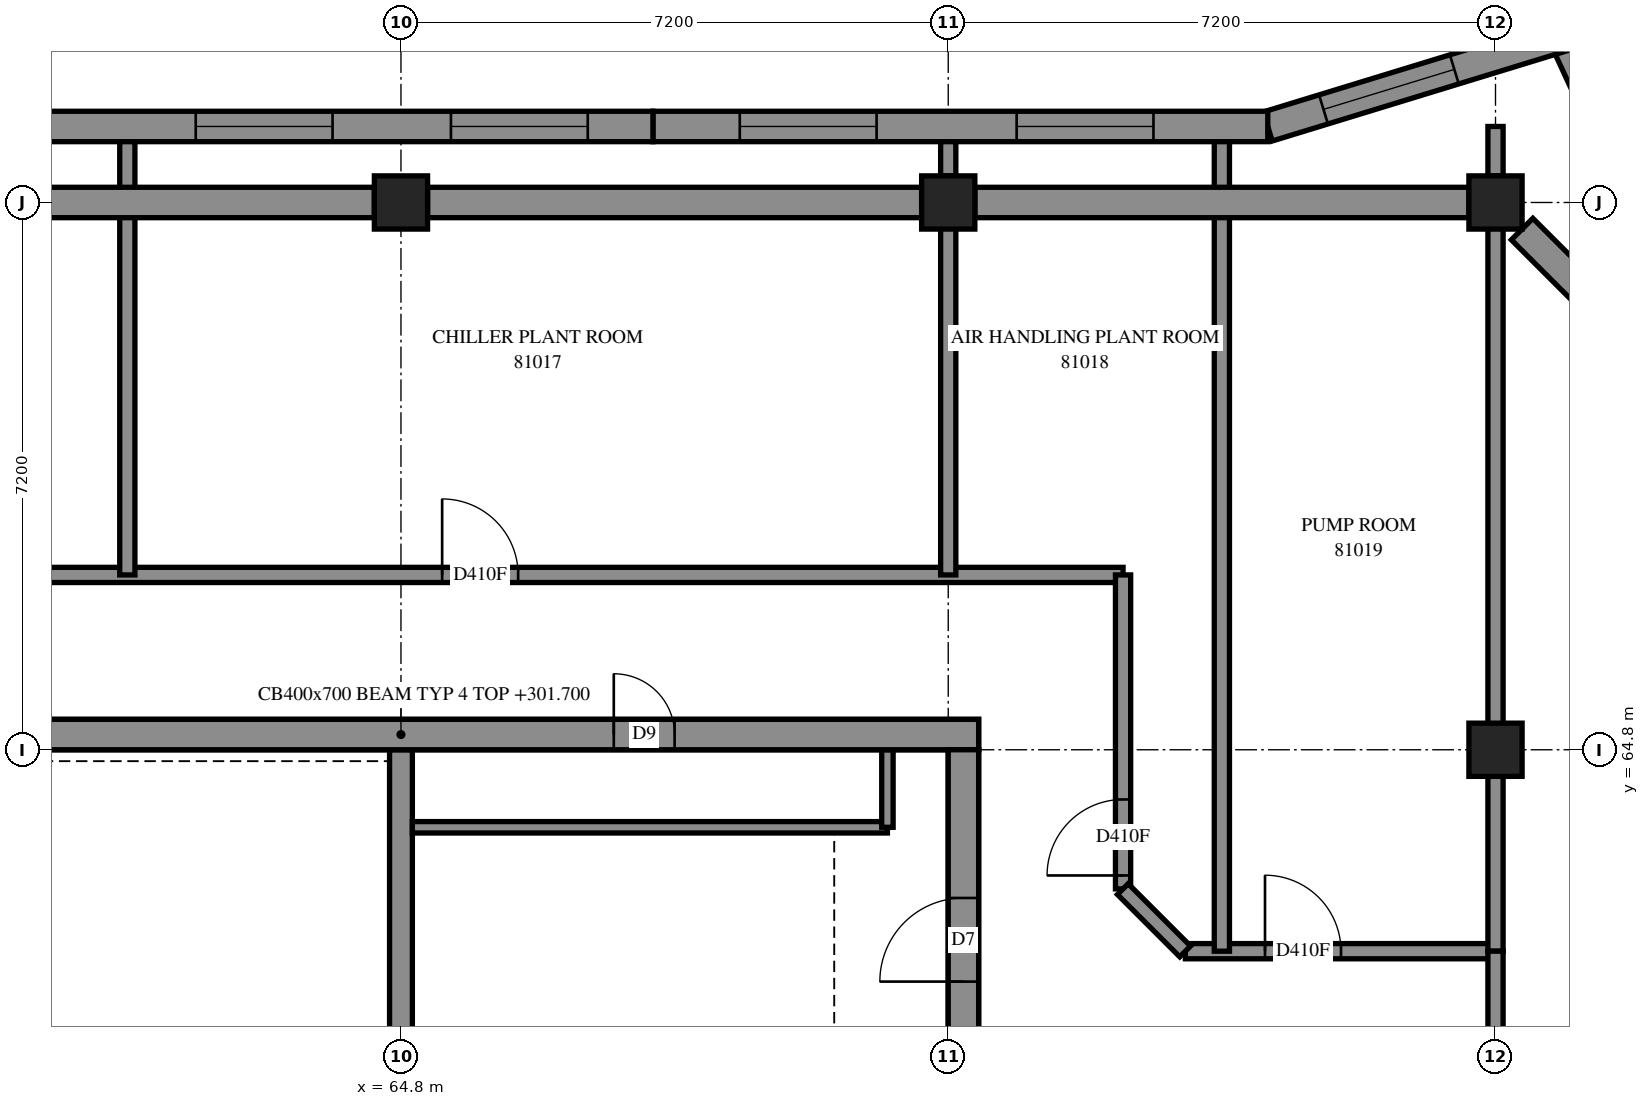
"""IFC4 building model, lengths in metres.
Left out: names, types, materials, properties, quantities, classifications, styles, units other than length and angle.
Written with IfcOpenShell. Run it as: python <this file> out.ifc"""

import sys

from ifc_helpers import new_model, si_unit, direction, frame, frame_2d, origin, origin_2d, place, context, subcontext, project, spatial, polyline, rectangle, outline, extrude, element, fill, save


model = new_model("IFC4")
c1 = context("Model", 3, precision=1e-05, world=origin(), true_north=direction((0.0, 1.0)))
c2 = subcontext(c1, "Body", "Model", "MODEL_VIEW")
j1 = project(units=[si_unit("LENGTHUNIT", "METRE"), si_unit("PLANEANGLEUNIT", "RADIAN")], contexts=[c1])
p1 = place(None, origin())
s1 = spatial("IfcSite", under=j1, at=p1, CompositionType="ELEMENT")
p2 = place(p1, origin())
s2 = spatial("IfcBuilding", under=s1, at=p2, CompositionType="ELEMENT")
p3 = place(p2, frame((0.0, 0.0, 298.2)))
s3 = spatial("IfcBuildingStorey", under=s2, at=p3, CompositionType="ELEMENT", Elevation=298.2)
for number, where, z_axis, x_axis in (
    (1, (64.8, 72.0, 0.0), (0.0, 0.0, 1.0), (1.0, 0.0, 0.0)),
    (2, (72.0, 72.0, 0.0), (0.0, 0.0, 1.0), (1.0, 0.0, 0.0)),
    (3, (79.2, 64.8, 0.0), (0.0, 0.0, 1.0), (1.0, 0.0, 0.0)),
    (4, (79.2, 72.0, 0.0), (0.0, 0.0, 1.0), (1.0, 0.0, 0.0)),
):
    element("IfcColumn", number, at=place(p3, frame(where, z_axis=z_axis, x_axis=x_axis)), inside=s3, PredefinedType="COLUMN", context=c2, shape_type="SweptSolid", body=[
        extrude(rectangle(XDim=0.7, YDim=0.7, at=origin_2d()), origin(), (0.0, 0.0, 1.0), 3.5),
    ])
p4 = place(p3, frame((57.2, 65.0, -0.3), z_axis=(0.0, 0.0, 1.0), x_axis=(1.0, 0.0, 0.0)))
e5 = element("IfcWall", 5, at=p4, inside=s3, PredefinedType="SHEAR", context=c2, shape_type="SweptSolid", body=[
    extrude(outline(polyline([(0.0, 0.0), (15.2, 0.0), (15.2, 3.1), (0.0, 3.1), (0.0, 0.0)])), frame((0.0, 0.2, 0.0), z_axis=(0.0, -1.0, 0.0), x_axis=(1.0, 0.0, 0.0)), (0.0, 0.0, 1.0), 0.4),
])
p5 = place(p4, frame((10.4, 0.0, 0.3)))
e6 = element("IfcOpeningElement", 6, at=p5, cuts=e5, PredefinedType="OPENING", context=c2, shape_type="SweptSolid", body=[
    extrude(rectangle(XDim=0.8, YDim=2.1, at=frame_2d((0.4, 1.05))), frame((0.0, 0.21, 0.0), z_axis=(0.0, -1.0, 0.0), x_axis=(1.0, 0.0, 0.0)), (0.0, 0.0, 1.0), 0.42),
])
p6 = place(p3, frame((72.2, 50.4, -0.3), z_axis=(0.0, 0.0, 1.0), x_axis=(0.0, 1.0, 0.0)))
e7 = element("IfcWall", 7, at=p6, inside=s3, PredefinedType="SHEAR", context=c2, shape_type="SweptSolid", body=[
    extrude(outline(polyline([(0.0, 0.0), (14.4, 0.0), (14.4, 3.1), (0.0, 3.1), (0.0, 0.0)])), frame((0.0, 0.2, 0.0), z_axis=(0.0, -1.0, 0.0), x_axis=(1.0, 0.0, 0.0)), (0.0, 0.0, 1.0), 0.4),
])
p7 = place(p6, frame((4.55, 0.0, 0.3)))
e8 = element("IfcOpeningElement", 8, at=p7, cuts=e7, PredefinedType="OPENING", context=c2, shape_type="SweptSolid", body=[
    extrude(rectangle(XDim=1.1, YDim=2.1, at=frame_2d((0.55, 1.05))), frame((0.0, 0.21, 0.0), z_axis=(0.0, -1.0, 0.0), x_axis=(1.0, 0.0, 0.0)), (0.0, 0.0, 1.0), 0.42),
])
p8 = place(p6, frame((11.35, 0.0, 0.3)))
e9 = element("IfcOpeningElement", 9, at=p8, cuts=e7, PredefinedType="OPENING", context=c2, shape_type="SweptSolid", body=[
    extrude(rectangle(XDim=1.1, YDim=2.1, at=frame_2d((0.55, 1.05))), frame((0.0, 0.21, 0.0), z_axis=(0.0, -1.0, 0.0), x_axis=(1.0, 0.0, 0.0)), (0.0, 0.0, 1.0), 0.42),
])
p9 = place(p3, frame((64.8, 60.6, 0.0), z_axis=(0.0, 0.0, 1.0), x_axis=(0.0, 1.0, 0.0)))
e10 = element("IfcWall", 10, at=p9, inside=s3, PredefinedType="SOLIDWALL", context=c2, shape_type="SweptSolid", body=[
    extrude(outline(polyline([(0.0, 0.0), (4.2, 0.0), (4.2, 3.5), (0.0, 3.5), (0.0, 0.0)])), frame((0.0, 0.15, 0.0), z_axis=(0.0, -1.0, 0.0), x_axis=(1.0, 0.0, 0.0)), (0.0, 0.0, 1.0), 0.3),
])
p10 = place(p3, frame((81.53, 71.085, 0.0), z_axis=(0.0, 0.0, 1.0), x_axis=(-0.4192676059, 0.9078626959, 0.0)))
e11 = element("IfcWall", 11, at=p10, inside=s3, PredefinedType="SOLIDWALL", context=c2, shape_type="SweptSolid", body=[
    extrude(outline(polyline([(0.036, -0.2), (3.596, -0.2), (3.247, 0.2), (-0.036, 0.2), (0.036, -0.2)])), origin(), (0.0, 0.0, 1.0), 3.5),
])
p11 = place(p10, frame((0.423, 0.0, 0.7)))
e12 = element("IfcOpeningElement", 12, at=p11, cuts=e11, PredefinedType="OPENING", context=c2, shape_type="SweptSolid", body=[
    extrude(rectangle(XDim=1.8, YDim=2.2, at=frame_2d((0.9, 1.1))), frame((0.0, 0.21, 0.0), z_axis=(0.0, -1.0, 0.0), x_axis=(1.0, 0.0, 0.0)), (0.0, 0.0, 1.0), 0.42),
])
p12 = place(p3, frame((80.095, 74.191, 0.0), z_axis=(0.0, 0.0, 1.0), x_axis=(-0.9562353211, -0.2925987194, 0.0)))
e13 = element("IfcWall", 13, at=p12, inside=s3, PredefinedType="SOLIDWALL", context=c2, shape_type="SweptSolid", body=[
    extrude(outline(polyline([(-0.174, -0.2), (4.039, -0.2), (4.099, 0.2), (0.174, 0.2), (-0.174, -0.2)])), origin(), (0.0, 0.0, 1.0), 3.5),
])
p13 = place(p12, frame((1.503, 0.0, 0.7)))
e14 = element("IfcOpeningElement", 14, at=p13, cuts=e13, PredefinedType="OPENING", context=c2, shape_type="SweptSolid", body=[
    extrude(rectangle(XDim=1.8, YDim=2.2, at=frame_2d((0.9, 1.1))), frame((0.0, 0.21, 0.0), z_axis=(0.0, -1.0, 0.0), x_axis=(1.0, 0.0, 0.0)), (0.0, 0.0, 1.0), 0.42),
])
p14 = place(p3, frame((76.204, 73.0, 0.0), z_axis=(0.0, 0.0, 1.0), x_axis=(-1.0, 0.0, 0.0)))
e15 = element("IfcWall", 15, at=p14, inside=s3, PredefinedType="SOLIDWALL", context=c2, shape_type="SweptSolid", body=[
    extrude(outline(polyline([(0.03, -0.2), (8.089, -0.2), (8.089, 0.2), (-0.03, 0.2), (0.03, -0.2)])), origin(), (0.0, 0.0, 1.0), 3.5),
])
p15 = place(p14, frame((1.504, 0.0, 0.7)))
e16 = element("IfcOpeningElement", 16, at=p15, cuts=e15, PredefinedType="OPENING", context=c2, shape_type="SweptSolid", body=[
    extrude(rectangle(XDim=1.8, YDim=2.2, at=frame_2d((0.9, 1.1))), frame((0.0, 0.21, 0.0), z_axis=(0.0, -1.0, 0.0), x_axis=(1.0, 0.0, 0.0)), (0.0, 0.0, 1.0), 0.42),
])
p16 = place(p14, frame((5.146, 0.0, 0.7)))
e17 = element("IfcOpeningElement", 17, at=p16, cuts=e15, PredefinedType="OPENING", context=c2, shape_type="SweptSolid", body=[
    extrude(rectangle(XDim=1.8, YDim=2.2, at=frame_2d((0.9, 1.1))), frame((0.0, 0.21, 0.0), z_axis=(0.0, -1.0, 0.0), x_axis=(1.0, 0.0, 0.0)), (0.0, 0.0, 1.0), 0.42),
])
p17 = place(p3, frame((68.115, 73.0, 0.0), z_axis=(0.0, 0.0, 1.0), x_axis=(-1.0, 0.0, 0.0)))
e18 = element("IfcWall", 18, at=p17, inside=s3, PredefinedType="SOLIDWALL", context=c2, shape_type="SweptSolid", body=[
    extrude(outline(polyline([(0.0, -0.2), (8.059, -0.2), (8.059, 0.2), (0.0, 0.2), (0.0, -0.2)])), origin(), (0.0, 0.0, 1.0), 3.0),
])
p18 = place(p17, frame((0.857, 0.0, 0.7)))
e19 = element("IfcOpeningElement", 19, at=p18, cuts=e18, PredefinedType="OPENING", context=c2, shape_type="SweptSolid", body=[
    extrude(rectangle(XDim=1.8, YDim=2.2, at=frame_2d((0.9, 1.1))), frame((0.0, 0.21, 0.0), z_axis=(0.0, -1.0, 0.0), x_axis=(1.0, 0.0, 0.0)), (0.0, 0.0, 1.0), 0.42),
])
p19 = place(p17, frame((4.215, 0.0, 0.7)))
e20 = element("IfcOpeningElement", 20, at=p19, cuts=e18, PredefinedType="OPENING", context=c2, shape_type="SweptSolid", body=[
    extrude(rectangle(XDim=1.8, YDim=2.2, at=frame_2d((0.9, 1.1))), frame((0.0, 0.21, 0.0), z_axis=(0.0, -1.0, 0.0), x_axis=(1.0, 0.0, 0.0)), (0.0, 0.0, 1.0), 0.42),
])
p20 = place(p3, frame((64.95, 63.78, 0.0), z_axis=(0.0, 0.0, 1.0), x_axis=(1.0, 0.0, 0.0)))
e21 = element("IfcWall", 21, at=p20, inside=s3, PredefinedType="PARTITIONING", context=c2, shape_type="SweptSolid", body=[
    extrude(outline(polyline([(0.0, 0.0), (6.25, 0.0), (6.25, 3.5), (0.0, 3.5), (0.0, 0.0)])), frame((0.0, 0.075, 0.0), z_axis=(0.0, -1.0, 0.0), x_axis=(1.0, 0.0, 0.0)), (0.0, 0.0, 1.0), 0.15),
])
p21 = place(p3, frame((71.2, 63.78, 0.0), z_axis=(0.0, 0.0, 1.0), x_axis=(0.0, 1.0, 0.0)))
e22 = element("IfcWall", 22, at=p21, inside=s3, PredefinedType="PARTITIONING", context=c2, shape_type="SweptSolid", body=[
    extrude(outline(polyline([(0.0, 0.0), (1.02, 0.0), (1.02, 3.5), (0.0, 3.5), (0.0, 0.0)])), frame((0.0, 0.075, 0.0), z_axis=(0.0, -1.0, 0.0), x_axis=(1.0, 0.0, 0.0)), (0.0, 0.0, 1.0), 0.15),
])
p22 = place(p3, frame((55.302, 67.1, 0.0), z_axis=(0.0, 0.0, 1.0), x_axis=(1.0, 0.0, 0.0)))
e23 = element("IfcWall", 23, at=p22, inside=s3, PredefinedType="PARTITIONING", context=c2, shape_type="SweptSolid", body=[
    extrude(rectangle(XDim=18.998, YDim=0.2, at=frame_2d((9.499, 0.0))), origin(), (0.0, 0.0, 1.0), 3.5),
])
p23 = place(p22, frame((0.758, 0.0, 0.0)))
e24 = element("IfcOpeningElement", 24, at=p23, cuts=e23, PredefinedType="OPENING", context=c2, shape_type="SweptSolid", body=[
    extrude(rectangle(XDim=1.0, YDim=2.1, at=frame_2d((0.5, 1.05))), frame((0.0, 0.11, 0.0), z_axis=(0.0, -1.0, 0.0), x_axis=(1.0, 0.0, 0.0)), (0.0, 0.0, 1.0), 0.22),
])
p24 = place(p22, frame((10.04, 0.0, 0.0)))
e25 = element("IfcOpeningElement", 25, at=p24, cuts=e23, PredefinedType="OPENING", context=c2, shape_type="SweptSolid", body=[
    extrude(rectangle(XDim=1.0, YDim=2.1, at=frame_2d((0.5, 1.05))), frame((0.0, 0.11, 0.0), z_axis=(0.0, -1.0, 0.0), x_axis=(1.0, 0.0, 0.0)), (0.0, 0.0, 1.0), 0.22),
])
p25 = place(p3, frame((79.2, 64.45, 0.0), z_axis=(0.0, 0.0, 1.0), x_axis=(0.0, 1.0, 0.0)))
e26 = element("IfcWall", 26, at=p25, inside=s3, PredefinedType="PARTITIONING", context=c2, shape_type="SweptSolid", body=[
    extrude(rectangle(XDim=7.9, YDim=0.2, at=frame_2d((3.95, 0.0))), origin(), (0.0, 0.0, 1.0), 3.5),
])
p26 = place(p3, frame((72.0, 67.1, 0.0), z_axis=(0.0, 0.0, 1.0), x_axis=(0.0, 1.0, 0.0)))
e27 = element("IfcWall", 27, at=p26, inside=s3, PredefinedType="PARTITIONING", context=c2, shape_type="SweptSolid", body=[
    extrude(rectangle(XDim=5.25, YDim=0.2, at=frame_2d((2.625, 0.0))), origin(), (0.0, 0.0, 1.0), 3.5),
])
p27 = place(p3, frame((74.3, 62.97, 0.0), z_axis=(0.0, 0.0, 1.0), x_axis=(0.0, 1.0, 0.0)))
e28 = element("IfcWall", 28, at=p27, inside=s3, PredefinedType="PARTITIONING", context=c2, shape_type="SweptSolid", body=[
    extrude(rectangle(XDim=4.13, YDim=0.2, at=frame_2d((2.065, 0.0))), origin(), (0.0, 0.0, 1.0), 3.5),
])
p28 = place(p27, frame((0.176, 0.0, 0.0)))
e29 = element("IfcOpeningElement", 29, at=p28, cuts=e28, PredefinedType="OPENING", context=c2, shape_type="SweptSolid", body=[
    extrude(rectangle(XDim=1.0, YDim=2.1, at=frame_2d((0.5, 1.05))), frame((0.0, 0.11, 0.0), z_axis=(0.0, -1.0, 0.0), x_axis=(1.0, 0.0, 0.0)), (0.0, 0.0, 1.0), 0.22),
])
p29 = place(p3, frame((75.12, 62.15, 0.0), z_axis=(0.0, 0.0, 1.0), x_axis=(1.0, 0.0, 0.0)))
e30 = element("IfcWall", 30, at=p29, inside=s3, PredefinedType="PARTITIONING", context=c2, shape_type="SweptSolid", body=[
    extrude(rectangle(XDim=4.08, YDim=0.2, at=frame_2d((2.04, 0.0))), origin(), (0.0, 0.0, 1.0), 3.5),
])
p30 = place(p29, frame((1.048, 0.0, 0.0)))
e31 = element("IfcOpeningElement", 31, at=p30, cuts=e30, PredefinedType="OPENING", context=c2, shape_type="SweptSolid", body=[
    extrude(rectangle(XDim=1.0, YDim=2.1, at=frame_2d((0.5, 1.05))), frame((0.0, 0.11, 0.0), z_axis=(0.0, -1.0, 0.0), x_axis=(1.0, 0.0, 0.0)), (0.0, 0.0, 1.0), 0.22),
])
p31 = place(p3, frame((79.2, 62.15, 0.0), z_axis=(0.0, 0.0, 1.0), x_axis=(0.0, 1.0, 0.0)))
e32 = element("IfcWall", 32, at=p31, inside=s3, PredefinedType="PARTITIONING", context=c2, shape_type="SweptSolid", body=[
    extrude(rectangle(XDim=2.3, YDim=0.2, at=frame_2d((1.15, 0.0))), origin(), (0.0, 0.0, 1.0), 3.5),
])
p32 = place(p3, frame((79.2, 60.25, 0.0), z_axis=(0.0, 0.0, 1.0), x_axis=(0.0, 1.0, 0.0)))
e33 = element("IfcWall", 33, at=p32, inside=s3, PredefinedType="PARTITIONING", context=c2, shape_type="SweptSolid", body=[
    extrude(rectangle(XDim=1.9, YDim=0.2, at=frame_2d((0.95, 0.0))), origin(), (0.0, 0.0, 1.0), 3.5),
])
p33 = place(p3, frame((74.297, 62.967, 0.0), z_axis=(0.0, 0.0, 1.0), x_axis=(0.7071067812, -0.7071067812, 0.0)))
e34 = element("IfcWall", 34, at=p33, inside=s3, PredefinedType="PARTITIONING", context=c2, shape_type="SweptSolid", body=[
    extrude(rectangle(XDim=1.16, YDim=0.2, at=frame_2d((0.58, 0.0))), origin(), (0.0, 0.0, 1.0), 3.5),
])
p34 = place(p3, frame((79.2, 72.35, 0.0), z_axis=(0.0, 0.0, 1.0), x_axis=(0.0, 1.0, 0.0)))
e35 = element("IfcWall", 35, at=p34, inside=s3, PredefinedType="PARTITIONING", context=c2, shape_type="SweptSolid", body=[
    extrude(rectangle(XDim=0.65, YDim=0.2, at=frame_2d((0.325, 0.0))), origin(), (0.0, 0.0, 1.0), 3.5),
])
p35 = place(p3, frame((75.6, 62.15, 0.0), z_axis=(0.0, 0.0, 1.0), x_axis=(0.0, 1.0, 0.0)))
e36 = element("IfcWall", 36, at=p35, inside=s3, PredefinedType="PARTITIONING", context=c2, shape_type="SweptSolid", body=[
    extrude(outline(polyline([(0.0, -0.1), (10.65, -0.1), (10.65, 0.1), (0.0, 0.1), (0.0, -0.1)])), origin(), (0.0, 0.0, 1.0), 3.5),
])
p36 = place(p3, frame((61.2, 67.1, 0.0), z_axis=(0.0, 0.0, 1.0), x_axis=(0.0, 1.0, 0.0)))
e37 = element("IfcWall", 37, at=p36, inside=s3, PredefinedType="PARTITIONING", context=c2, shape_type="SweptSolid", body=[
    extrude(outline(polyline([(0.0, -0.1), (5.7, -0.1), (5.7, 0.1), (0.0, 0.1), (0.0, -0.1)])), origin(), (0.0, 0.0, 1.0), 3.5),
])
p37 = place(p3, frame((72.0, 72.35, 0.0), z_axis=(0.0, 0.0, 1.0), x_axis=(0.0, 1.0, 0.0)))
e38 = element("IfcWall", 38, at=p37, inside=s3, PredefinedType="PARTITIONING", context=c2, shape_type="SweptSolid", body=[
    extrude(outline(polyline([(0.0, -0.1), (0.45, -0.1), (0.45, 0.1), (0.0, 0.1), (0.0, -0.1)])), origin(), (0.0, 0.0, 1.0), 3.5),
])
p38 = place(p13, origin())
e39 = element("IfcWindow", 39, at=p38, inside=s3, PartitioningType="SINGLE_PANEL", PredefinedType="WINDOW", context=c2, shape_type="SweptSolid", body=[
    extrude(rectangle(XDim=1.8, YDim=2.2, at=frame_2d((0.9, 1.1))), frame((0.0, 0.08, 0.0), z_axis=(0.0, -1.0, 0.0), x_axis=(1.0, 0.0, 0.0)), (0.0, 0.0, 1.0), 0.06),
])
fill(e14, e39)
p39 = place(p15, origin())
e40 = element("IfcWindow", 40, at=p39, inside=s3, PartitioningType="SINGLE_PANEL", PredefinedType="WINDOW", context=c2, shape_type="SweptSolid", body=[
    extrude(rectangle(XDim=1.8, YDim=2.2, at=frame_2d((0.9, 1.1))), frame((0.0, 0.08, 0.0), z_axis=(0.0, -1.0, 0.0), x_axis=(1.0, 0.0, 0.0)), (0.0, 0.0, 1.0), 0.06),
])
fill(e16, e40)
p40 = place(p16, origin())
e41 = element("IfcWindow", 41, at=p40, inside=s3, PartitioningType="SINGLE_PANEL", PredefinedType="WINDOW", context=c2, shape_type="SweptSolid", body=[
    extrude(rectangle(XDim=1.8, YDim=2.2, at=frame_2d((0.9, 1.1))), frame((0.0, 0.08, 0.0), z_axis=(0.0, -1.0, 0.0), x_axis=(1.0, 0.0, 0.0)), (0.0, 0.0, 1.0), 0.06),
])
fill(e17, e41)
p41 = place(p18, origin())
e42 = element("IfcWindow", 42, at=p41, inside=s3, PartitioningType="SINGLE_PANEL", PredefinedType="WINDOW", context=c2, shape_type="SweptSolid", body=[
    extrude(rectangle(XDim=1.8, YDim=2.2, at=frame_2d((0.9, 1.1))), frame((0.0, 0.08, 0.0), z_axis=(0.0, -1.0, 0.0), x_axis=(1.0, 0.0, 0.0)), (0.0, 0.0, 1.0), 0.06),
])
fill(e19, e42)
p42 = place(p19, origin())
e43 = element("IfcWindow", 43, at=p42, inside=s3, PartitioningType="SINGLE_PANEL", PredefinedType="WINDOW", context=c2, shape_type="SweptSolid", body=[
    extrude(rectangle(XDim=1.8, YDim=2.2, at=frame_2d((0.9, 1.1))), frame((0.0, 0.08, 0.0), z_axis=(0.0, -1.0, 0.0), x_axis=(1.0, 0.0, 0.0)), (0.0, 0.0, 1.0), 0.06),
])
fill(e20, e43)
p43 = place(p5, origin())
e44 = element("IfcDoor", 44, at=p43, inside=s3, OperationType="SINGLE_SWING_RIGHT", PredefinedType="DOOR", context=c2, shape_type="SweptSolid", body=[
    extrude(rectangle(XDim=0.8, YDim=2.1, at=frame_2d((0.4, 1.05))), frame((0.0, 0.025, 0.0), z_axis=(0.0, -1.0, 0.0), x_axis=(1.0, 0.0, 0.0)), (0.0, 0.0, 1.0), 0.05),
])
fill(e6, e44)
p44 = place(p8, origin())
e45 = element("IfcDoor", 45, at=p44, inside=s3, OperationType="SINGLE_SWING_RIGHT", PredefinedType="DOOR", context=c2, shape_type="SweptSolid", body=[
    extrude(rectangle(XDim=1.1, YDim=2.1, at=frame_2d((0.55, 1.05))), frame((0.0, 0.025, 0.0), z_axis=(0.0, -1.0, 0.0), x_axis=(1.0, 0.0, 0.0)), (0.0, 0.0, 1.0), 0.05),
])
fill(e9, e45)
p45 = place(p24, origin())
e46 = element("IfcDoor", 46, at=p45, inside=s3, OperationType="SINGLE_SWING_LEFT", PredefinedType="DOOR", context=c2, shape_type="SweptSolid", body=[
    extrude(rectangle(XDim=1.0, YDim=2.1, at=frame_2d((0.5, 1.05))), frame((0.0, 0.025, 0.0), z_axis=(0.0, -1.0, 0.0), x_axis=(1.0, 0.0, 0.0)), (0.0, 0.0, 1.0), 0.05),
])
fill(e25, e46)
p46 = place(p28, origin())
e47 = element("IfcDoor", 47, at=p46, inside=s3, OperationType="SINGLE_SWING_RIGHT", PredefinedType="DOOR", context=c2, shape_type="SweptSolid", body=[
    extrude(rectangle(XDim=1.0, YDim=2.1, at=frame_2d((0.5, 1.05))), frame((0.0, 0.025, 0.0), z_axis=(0.0, -1.0, 0.0), x_axis=(1.0, 0.0, 0.0)), (0.0, 0.0, 1.0), 0.05),
])
fill(e29, e47)
p47 = place(p30, origin())
e48 = element("IfcDoor", 48, at=p47, inside=s3, OperationType="SINGLE_SWING_LEFT", PredefinedType="DOOR", context=c2, shape_type="SweptSolid", body=[
    extrude(rectangle(XDim=1.0, YDim=2.1, at=frame_2d((0.5, 1.05))), frame((0.0, 0.025, 0.0), z_axis=(0.0, -1.0, 0.0), x_axis=(1.0, 0.0, 0.0)), (0.0, 0.0, 1.0), 0.05),
])
fill(e31, e48)
save(model, sys.argv[1])
